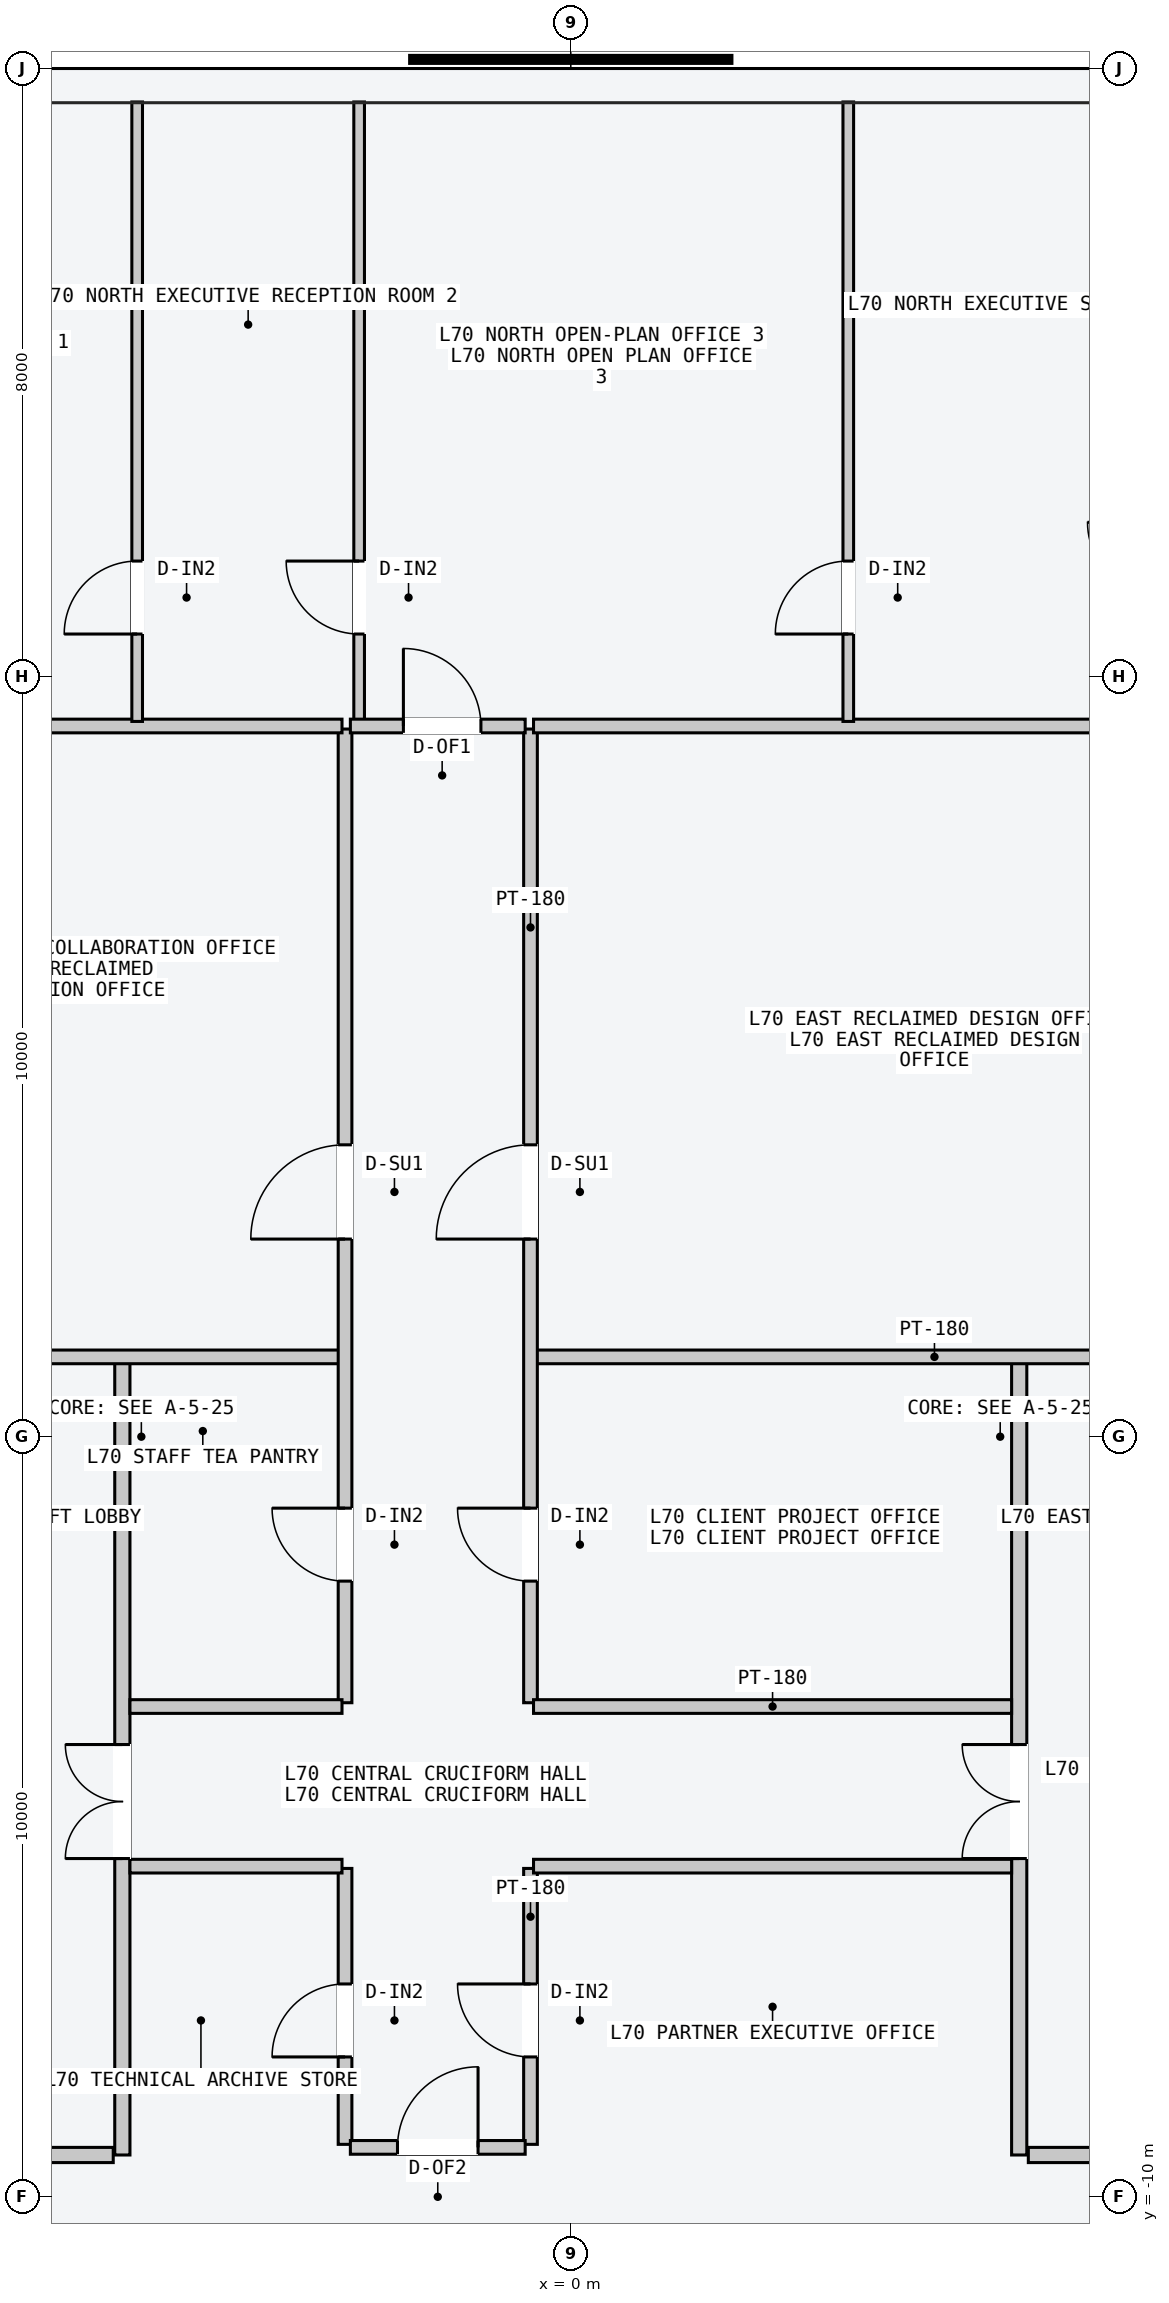
"""IFC4 building model, lengths in metres.
Left out: names, types, materials, properties, quantities, classifications, styles, units other than length and angle.
Written with IfcOpenShell. Run it as: python <this file> out.ifc"""

import sys

from ifc_helpers import new_model, si_unit, direction, frame, frame_2d, origin, place, context, subcontext, project, spatial, rectangle, extrude, element, fill, save


model = new_model("IFC4")
c1 = context("Model", 3, precision=1e-05, world=origin(), true_north=direction((0.0, 1.0)))
c2 = subcontext(c1, "Body", "Model", "MODEL_VIEW")
j1 = project(units=[si_unit("LENGTHUNIT", "METRE"), si_unit("PLANEANGLEUNIT", "RADIAN")], contexts=[c1])
p1 = place(None, origin())
s1 = spatial("IfcSite", under=j1, at=p1, CompositionType="ELEMENT")
p2 = place(p1, origin())
s2 = spatial("IfcBuilding", under=s1, at=p2, CompositionType="ELEMENT")
p3 = place(p2, frame((0.0, 0.0, 265.2)))
s3 = spatial("IfcBuildingStorey", under=s2, at=p3, CompositionType="ELEMENT", Elevation=265.2)
p4 = place(p3, frame((-5.9, -9.45, 0.0), z_axis=(0.0, 0.0, 1.0), x_axis=(0.0, 1.0, 0.0)))
e1 = element("IfcWall", 1, at=p4, inside=s3, PredefinedType="PARTITIONING", context=c2, shape_type="SweptSolid", body=[
    extrude(rectangle(XDim=10.5, YDim=0.2, at=frame_2d((5.25, 0.0))), origin(), (0.0, 0.0, 1.0), 3.4),
])
p5 = place(p4, frame((3.9, 0.0, 0.0)))
e2 = element("IfcOpeningElement", 2, at=p5, cuts=e1, PredefinedType="OPENING", context=c2, shape_type="SweptSolid", body=[
    extrude(rectangle(XDim=1.5, YDim=2.2, at=frame_2d((0.75, 1.1))), frame((0.0, 0.11, 0.0), z_axis=(0.0, -1.0, 0.0), x_axis=(1.0, 0.0, 0.0)), (0.0, 0.0, 1.0), 0.22),
])
p6 = place(p3, frame((-6.02, -9.45, 0.0), z_axis=(0.0, 0.0, 1.0), x_axis=(-1.0, 0.0, 0.0)))
e3 = element("IfcWall", 3, at=p6, inside=s3, PredefinedType="PARTITIONING", context=c2, shape_type="SweptSolid", body=[
    extrude(rectangle(XDim=1.8, YDim=0.2, at=frame_2d((0.9, 0.0))), origin(), (0.0, 0.0, 1.0), 3.4),
])
p7 = place(p3, frame((5.9, -9.45, 0.0), z_axis=(0.0, 0.0, 1.0), x_axis=(0.0, 1.0, 0.0)))
e4 = element("IfcWall", 4, at=p7, inside=s3, PredefinedType="PARTITIONING", context=c2, shape_type="SweptSolid", body=[
    extrude(rectangle(XDim=10.5, YDim=0.2, at=frame_2d((5.25, 0.0))), origin(), (0.0, 0.0, 1.0), 3.4),
])
p8 = place(p7, frame((3.9, 0.0, 0.0)))
e5 = element("IfcOpeningElement", 5, at=p8, cuts=e4, PredefinedType="OPENING", context=c2, shape_type="SweptSolid", body=[
    extrude(rectangle(XDim=1.5, YDim=2.2, at=frame_2d((0.75, 1.1))), frame((0.0, 0.11, 0.0), z_axis=(0.0, -1.0, 0.0), x_axis=(1.0, 0.0, 0.0)), (0.0, 0.0, 1.0), 0.22),
])
p9 = place(p3, frame((6.02, -9.45, 0.0), z_axis=(0.0, 0.0, 1.0), x_axis=(1.0, 0.0, 0.0)))
e6 = element("IfcWall", 6, at=p9, inside=s3, PredefinedType="PARTITIONING", context=c2, shape_type="SweptSolid", body=[
    extrude(rectangle(XDim=1.8, YDim=0.2, at=frame_2d((0.9, 0.0))), origin(), (0.0, 0.0, 1.0), 3.4),
])
p10 = place(p3, frame((-10.05, 1.05, 0.0), z_axis=(0.0, 0.0, 1.0), x_axis=(1.0, 0.0, 0.0)))
e7 = element("IfcWall", 7, at=p10, inside=s3, PredefinedType="PARTITIONING", context=c2, shape_type="SweptSolid", body=[
    extrude(rectangle(XDim=7.04, YDim=0.18, at=frame_2d((3.52, 0.0))), origin(), (0.0, 0.0, 1.0), 3.4),
])
p11 = place(p3, frame((-2.97, -3.5, 0.0), z_axis=(0.0, 0.0, 1.0), x_axis=(0.0, 1.0, 0.0)))
e8 = element("IfcWall", 8, at=p11, inside=s3, PredefinedType="PARTITIONING", context=c2, shape_type="SweptSolid", body=[
    extrude(rectangle(XDim=12.81, YDim=0.18, at=frame_2d((6.405, 0.0))), origin(), (0.0, 0.0, 1.0), 3.4),
])
p12 = place(p11, frame((6.1, 0.0, 0.0)))
e9 = element("IfcOpeningElement", 9, at=p12, cuts=e8, PredefinedType="OPENING", context=c2, shape_type="SweptSolid", body=[
    extrude(rectangle(XDim=1.24, YDim=2.24, at=frame_2d((0.62, 1.12))), frame((0.0, 0.1, 0.0), z_axis=(0.0, -1.0, 0.0), x_axis=(1.0, 0.0, 0.0)), (0.0, 0.0, 1.0), 0.2),
])
p13 = place(p11, frame((1.6, 0.0, 0.0)))
e10 = element("IfcOpeningElement", 10, at=p13, cuts=e8, PredefinedType="OPENING", context=c2, shape_type="SweptSolid", body=[
    extrude(rectangle(XDim=0.96, YDim=2.18, at=frame_2d((0.48, 1.09))), frame((0.0, 0.1, 0.0), z_axis=(0.0, -1.0, 0.0), x_axis=(1.0, 0.0, 0.0)), (0.0, 0.0, 1.0), 0.2),
])
p14 = place(p3, frame((-7.5, 9.35, 0.0), z_axis=(0.0, 0.0, 1.0), x_axis=(1.0, 0.0, 0.0)))
e11 = element("IfcWall", 11, at=p14, inside=s3, PredefinedType="PARTITIONING", context=c2, shape_type="SweptSolid", body=[
    extrude(rectangle(XDim=4.49, YDim=0.18, at=frame_2d((2.245, 0.0))), origin(), (0.0, 0.0, 1.0), 3.4),
])
p15 = place(p3, frame((-5.8, -3.55, 0.0), z_axis=(0.0, 0.0, 1.0), x_axis=(1.0, 0.0, 0.0)))
e12 = element("IfcWall", 12, at=p15, inside=s3, PredefinedType="PARTITIONING", context=c2, shape_type="SweptSolid", body=[
    extrude(rectangle(XDim=2.79, YDim=0.18, at=frame_2d((1.395, 0.0))), origin(), (0.0, 0.0, 1.0), 3.4),
])
p16 = place(p3, frame((-0.49, 1.05, 0.0), z_axis=(0.0, 0.0, 1.0), x_axis=(1.0, 0.0, 0.0)))
e13 = element("IfcWall", 13, at=p16, inside=s3, PredefinedType="PARTITIONING", context=c2, shape_type="SweptSolid", body=[
    extrude(rectangle(XDim=10.55, YDim=0.18, at=frame_2d((5.275, 0.0))), origin(), (0.0, 0.0, 1.0), 3.4),
])
p17 = place(p3, frame((-0.53, -3.5, 0.0), z_axis=(0.0, 0.0, 1.0), x_axis=(0.0, 1.0, 0.0)))
e14 = element("IfcWall", 14, at=p17, inside=s3, PredefinedType="PARTITIONING", context=c2, shape_type="SweptSolid", body=[
    extrude(rectangle(XDim=12.81, YDim=0.18, at=frame_2d((6.405, 0.0))), origin(), (0.0, 0.0, 1.0), 3.4),
])
p18 = place(p17, frame((6.1, 0.0, 0.0)))
e15 = element("IfcOpeningElement", 15, at=p18, cuts=e14, PredefinedType="OPENING", context=c2, shape_type="SweptSolid", body=[
    extrude(rectangle(XDim=1.24, YDim=2.24, at=frame_2d((0.62, 1.12))), frame((0.0, 0.1, 0.0), z_axis=(0.0, -1.0, 0.0), x_axis=(1.0, 0.0, 0.0)), (0.0, 0.0, 1.0), 0.2),
])
p19 = place(p17, frame((1.6, 0.0, 0.0)))
e16 = element("IfcOpeningElement", 16, at=p19, cuts=e14, PredefinedType="OPENING", context=c2, shape_type="SweptSolid", body=[
    extrude(rectangle(XDim=0.96, YDim=2.18, at=frame_2d((0.48, 1.09))), frame((0.0, 0.1, 0.0), z_axis=(0.0, -1.0, 0.0), x_axis=(1.0, 0.0, 0.0)), (0.0, 0.0, 1.0), 0.2),
])
p20 = place(p3, frame((-0.49, 9.35, 0.0), z_axis=(0.0, 0.0, 1.0), x_axis=(1.0, 0.0, 0.0)))
e17 = element("IfcWall", 17, at=p20, inside=s3, PredefinedType="PARTITIONING", context=c2, shape_type="SweptSolid", body=[
    extrude(rectangle(XDim=7.99, YDim=0.18, at=frame_2d((3.995, 0.0))), origin(), (0.0, 0.0, 1.0), 3.4),
])
p21 = place(p3, frame((-0.49, -3.55, 0.0), z_axis=(0.0, 0.0, 1.0), x_axis=(1.0, 0.0, 0.0)))
e18 = element("IfcWall", 18, at=p21, inside=s3, PredefinedType="PARTITIONING", context=c2, shape_type="SweptSolid", body=[
    extrude(rectangle(XDim=6.29, YDim=0.18, at=frame_2d((3.145, 0.0))), origin(), (0.0, 0.0, 1.0), 3.4),
])
p22 = place(p3, frame((-2.97, -9.31, 0.0), z_axis=(0.0, 0.0, 1.0), x_axis=(0.0, 1.0, 0.0)))
e19 = element("IfcWall", 19, at=p22, inside=s3, PredefinedType="PARTITIONING", context=c2, shape_type="SweptSolid", body=[
    extrude(rectangle(XDim=3.63, YDim=0.18, at=frame_2d((1.815, 0.0))), origin(), (0.0, 0.0, 1.0), 3.4),
])
p23 = place(p22, frame((1.15, 0.0, 0.0)))
e20 = element("IfcOpeningElement", 20, at=p23, cuts=e19, PredefinedType="OPENING", context=c2, shape_type="SweptSolid", body=[
    extrude(rectangle(XDim=0.96, YDim=2.18, at=frame_2d((0.48, 1.09))), frame((0.0, 0.1, 0.0), z_axis=(0.0, -1.0, 0.0), x_axis=(1.0, 0.0, 0.0)), (0.0, 0.0, 1.0), 0.2),
])
p24 = place(p3, frame((-0.53, -9.31, 0.0), z_axis=(0.0, 0.0, 1.0), x_axis=(0.0, 1.0, 0.0)))
e21 = element("IfcWall", 21, at=p24, inside=s3, PredefinedType="PARTITIONING", context=c2, shape_type="SweptSolid", body=[
    extrude(rectangle(XDim=3.63, YDim=0.18, at=frame_2d((1.815, 0.0))), origin(), (0.0, 0.0, 1.0), 3.4),
])
p25 = place(p24, frame((1.15, 0.0, 0.0)))
e22 = element("IfcOpeningElement", 22, at=p25, cuts=e21, PredefinedType="OPENING", context=c2, shape_type="SweptSolid", body=[
    extrude(rectangle(XDim=0.96, YDim=2.18, at=frame_2d((0.48, 1.09))), frame((0.0, 0.1, 0.0), z_axis=(0.0, -1.0, 0.0), x_axis=(1.0, 0.0, 0.0)), (0.0, 0.0, 1.0), 0.2),
])
p26 = place(p3, frame((-5.8, -5.65, 0.0), z_axis=(0.0, 0.0, 1.0), x_axis=(1.0, 0.0, 0.0)))
e23 = element("IfcWall", 23, at=p26, inside=s3, PredefinedType="PARTITIONING", context=c2, shape_type="SweptSolid", body=[
    extrude(rectangle(XDim=2.79, YDim=0.18, at=frame_2d((1.395, 0.0))), origin(), (0.0, 0.0, 1.0), 3.4),
])
p27 = place(p3, frame((-0.49, -5.65, 0.0), z_axis=(0.0, 0.0, 1.0), x_axis=(1.0, 0.0, 0.0)))
e24 = element("IfcWall", 24, at=p27, inside=s3, PredefinedType="PARTITIONING", context=c2, shape_type="SweptSolid", body=[
    extrude(rectangle(XDim=6.29, YDim=0.18, at=frame_2d((3.145, 0.0))), origin(), (0.0, 0.0, 1.0), 3.4),
])
p28 = place(p3, frame((-5.705, 9.41, 0.0), z_axis=(0.0, 0.0, 1.0), x_axis=(0.0, 1.0, 0.0)))
e25 = element("IfcWall", 25, at=p28, inside=s3, PredefinedType="PARTITIONING", context=c2, shape_type="SweptSolid", body=[
    extrude(rectangle(XDim=8.15, YDim=0.14, at=frame_2d((4.075, 0.0))), origin(), (0.0, 0.0, 1.0), 3.4),
])
p29 = place(p28, frame((1.15, 0.0, 0.0)))
e26 = element("IfcOpeningElement", 26, at=p29, cuts=e25, PredefinedType="OPENING", context=c2, shape_type="SweptSolid", body=[
    extrude(rectangle(XDim=0.96, YDim=2.18, at=frame_2d((0.48, 1.09))), frame((0.0, 0.08, 0.0), z_axis=(0.0, -1.0, 0.0), x_axis=(1.0, 0.0, 0.0)), (0.0, 0.0, 1.0), 0.16),
])
p30 = place(p3, frame((-2.785, 9.41, 0.0), z_axis=(0.0, 0.0, 1.0), x_axis=(0.0, 1.0, 0.0)))
e27 = element("IfcWall", 27, at=p30, inside=s3, PredefinedType="PARTITIONING", context=c2, shape_type="SweptSolid", body=[
    extrude(rectangle(XDim=8.15, YDim=0.14, at=frame_2d((4.075, 0.0))), origin(), (0.0, 0.0, 1.0), 3.4),
])
p31 = place(p30, frame((1.15, 0.0, 0.0)))
e28 = element("IfcOpeningElement", 28, at=p31, cuts=e27, PredefinedType="OPENING", context=c2, shape_type="SweptSolid", body=[
    extrude(rectangle(XDim=0.96, YDim=2.18, at=frame_2d((0.48, 1.09))), frame((0.0, 0.08, 0.0), z_axis=(0.0, -1.0, 0.0), x_axis=(1.0, 0.0, 0.0)), (0.0, 0.0, 1.0), 0.16),
])
p32 = place(p3, frame((3.651, 9.41, 0.0), z_axis=(0.0, 0.0, 1.0), x_axis=(0.0, 1.0, 0.0)))
e29 = element("IfcWall", 29, at=p32, inside=s3, PredefinedType="PARTITIONING", context=c2, shape_type="SweptSolid", body=[
    extrude(rectangle(XDim=8.15, YDim=0.14, at=frame_2d((4.075, 0.0))), origin(), (0.0, 0.0, 1.0), 3.4),
])
p33 = place(p32, frame((1.15, 0.0, 0.0)))
e30 = element("IfcOpeningElement", 30, at=p33, cuts=e29, PredefinedType="OPENING", context=c2, shape_type="SweptSolid", body=[
    extrude(rectangle(XDim=0.96, YDim=2.18, at=frame_2d((0.48, 1.09))), frame((0.0, 0.08, 0.0), z_axis=(0.0, -1.0, 0.0), x_axis=(1.0, 0.0, 0.0)), (0.0, 0.0, 1.0), 0.16),
])
p34 = place(p3, frame((-2.9, 9.35, 0.0), z_axis=(0.0, 0.0, 1.0), x_axis=(1.0, 0.0, 0.0)))
e31 = element("IfcWall", 31, at=p34, inside=s3, PredefinedType="PARTITIONING", context=c2, shape_type="SweptSolid", body=[
    extrude(rectangle(XDim=2.3, YDim=0.18, at=frame_2d((1.15, 0.0))), origin(), (0.0, 0.0, 1.0), 3.4),
])
p35 = place(p34, frame((0.698, 0.0, 0.0)))
e32 = element("IfcOpeningElement", 32, at=p35, cuts=e31, PredefinedType="OPENING", context=c2, shape_type="SweptSolid", body=[
    extrude(rectangle(XDim=1.02, YDim=2.2, at=frame_2d((0.51, 1.1))), frame((0.0, 0.1, 0.0), z_axis=(0.0, -1.0, 0.0), x_axis=(1.0, 0.0, 0.0)), (0.0, 0.0, 1.0), 0.2),
])
p36 = place(p3, frame((-2.9, -9.35, 0.0), z_axis=(0.0, 0.0, 1.0), x_axis=(1.0, 0.0, 0.0)))
e33 = element("IfcWall", 33, at=p36, inside=s3, PredefinedType="PARTITIONING", context=c2, shape_type="SweptSolid", body=[
    extrude(rectangle(XDim=2.3, YDim=0.18, at=frame_2d((1.15, 0.0))), origin(), (0.0, 0.0, 1.0), 3.4),
])
p37 = place(p36, frame((0.62, 0.0, 0.0)))
e34 = element("IfcOpeningElement", 34, at=p37, cuts=e33, PredefinedType="OPENING", context=c2, shape_type="SweptSolid", body=[
    extrude(rectangle(XDim=1.06, YDim=2.2, at=frame_2d((0.53, 1.1))), frame((0.0, 0.1, 0.0), z_axis=(0.0, -1.0, 0.0), x_axis=(1.0, 0.0, 0.0)), (0.0, 0.0, 1.0), 0.2),
])
p38 = place(p5, origin())
e35 = element("IfcDoor", 35, at=p38, inside=s3, OperationType="DOUBLE_DOOR_SINGLE_SWING", PredefinedType="DOOR", context=c2, shape_type="SweptSolid", body=[
    extrude(rectangle(XDim=1.5, YDim=2.2, at=frame_2d((0.75, 1.1))), frame((0.0, 0.025, 0.0), z_axis=(0.0, -1.0, 0.0), x_axis=(1.0, 0.0, 0.0)), (0.0, 0.0, 1.0), 0.05),
])
fill(e2, e35)
p39 = place(p8, origin())
e36 = element("IfcDoor", 36, at=p39, inside=s3, OperationType="DOUBLE_DOOR_SINGLE_SWING", PredefinedType="DOOR", context=c2, shape_type="SweptSolid", body=[
    extrude(rectangle(XDim=1.5, YDim=2.2, at=frame_2d((0.75, 1.1))), frame((0.0, 0.025, 0.0), z_axis=(0.0, -1.0, 0.0), x_axis=(1.0, 0.0, 0.0)), (0.0, 0.0, 1.0), 0.05),
])
fill(e5, e36)
p40 = place(p12, origin())
e37 = element("IfcDoor", 37, at=p40, inside=s3, OperationType="SINGLE_SWING_LEFT", PredefinedType="DOOR", context=c2, shape_type="SweptSolid", body=[
    extrude(rectangle(XDim=1.24, YDim=2.24, at=frame_2d((0.62, 1.12))), frame((0.0, 0.025, 0.0), z_axis=(0.0, -1.0, 0.0), x_axis=(1.0, 0.0, 0.0)), (0.0, 0.0, 1.0), 0.05),
])
fill(e9, e37)
p41 = place(p13, origin())
e38 = element("IfcDoor", 38, at=p41, inside=s3, OperationType="SINGLE_SWING_RIGHT", PredefinedType="DOOR", context=c2, shape_type="SweptSolid", body=[
    extrude(rectangle(XDim=0.96, YDim=2.18, at=frame_2d((0.48, 1.09))), frame((0.0, 0.025, 0.0), z_axis=(0.0, -1.0, 0.0), x_axis=(1.0, 0.0, 0.0)), (0.0, 0.0, 1.0), 0.05),
])
fill(e10, e38)
p42 = place(p18, origin())
e39 = element("IfcDoor", 39, at=p42, inside=s3, OperationType="SINGLE_SWING_LEFT", PredefinedType="DOOR", context=c2, shape_type="SweptSolid", body=[
    extrude(rectangle(XDim=1.24, YDim=2.24, at=frame_2d((0.62, 1.12))), frame((0.0, 0.025, 0.0), z_axis=(0.0, -1.0, 0.0), x_axis=(1.0, 0.0, 0.0)), (0.0, 0.0, 1.0), 0.05),
])
fill(e15, e39)
p43 = place(p19, origin())
e40 = element("IfcDoor", 40, at=p43, inside=s3, OperationType="SINGLE_SWING_RIGHT", PredefinedType="DOOR", context=c2, shape_type="SweptSolid", body=[
    extrude(rectangle(XDim=0.96, YDim=2.18, at=frame_2d((0.48, 1.09))), frame((0.0, 0.025, 0.0), z_axis=(0.0, -1.0, 0.0), x_axis=(1.0, 0.0, 0.0)), (0.0, 0.0, 1.0), 0.05),
])
fill(e16, e40)
p44 = place(p23, origin())
e41 = element("IfcDoor", 41, at=p44, inside=s3, OperationType="SINGLE_SWING_LEFT", PredefinedType="DOOR", context=c2, shape_type="SweptSolid", body=[
    extrude(rectangle(XDim=0.96, YDim=2.18, at=frame_2d((0.48, 1.09))), frame((0.0, 0.025, 0.0), z_axis=(0.0, -1.0, 0.0), x_axis=(1.0, 0.0, 0.0)), (0.0, 0.0, 1.0), 0.05),
])
fill(e20, e41)
p45 = place(p25, origin())
e42 = element("IfcDoor", 42, at=p45, inside=s3, OperationType="SINGLE_SWING_RIGHT", PredefinedType="DOOR", context=c2, shape_type="SweptSolid", body=[
    extrude(rectangle(XDim=0.96, YDim=2.18, at=frame_2d((0.48, 1.09))), frame((0.0, 0.025, 0.0), z_axis=(0.0, -1.0, 0.0), x_axis=(1.0, 0.0, 0.0)), (0.0, 0.0, 1.0), 0.05),
])
fill(e22, e42)
p46 = place(p29, origin())
e43 = element("IfcDoor", 43, at=p46, inside=s3, OperationType="SINGLE_SWING_LEFT", PredefinedType="DOOR", context=c2, shape_type="SweptSolid", body=[
    extrude(rectangle(XDim=0.96, YDim=2.18, at=frame_2d((0.48, 1.09))), frame((0.0, 0.025, 0.0), z_axis=(0.0, -1.0, 0.0), x_axis=(1.0, 0.0, 0.0)), (0.0, 0.0, 1.0), 0.05),
])
fill(e26, e43)
p47 = place(p31, origin())
e44 = element("IfcDoor", 44, at=p47, inside=s3, OperationType="SINGLE_SWING_RIGHT", PredefinedType="DOOR", context=c2, shape_type="SweptSolid", body=[
    extrude(rectangle(XDim=0.96, YDim=2.18, at=frame_2d((0.48, 1.09))), frame((0.0, 0.025, 0.0), z_axis=(0.0, -1.0, 0.0), x_axis=(1.0, 0.0, 0.0)), (0.0, 0.0, 1.0), 0.05),
])
fill(e28, e44)
p48 = place(p33, origin())
e45 = element("IfcDoor", 45, at=p48, inside=s3, OperationType="SINGLE_SWING_LEFT", PredefinedType="DOOR", context=c2, shape_type="SweptSolid", body=[
    extrude(rectangle(XDim=0.96, YDim=2.18, at=frame_2d((0.48, 1.09))), frame((0.0, 0.025, 0.0), z_axis=(0.0, -1.0, 0.0), x_axis=(1.0, 0.0, 0.0)), (0.0, 0.0, 1.0), 0.05),
])
fill(e30, e45)
p49 = place(p35, origin())
e46 = element("IfcDoor", 46, at=p49, inside=s3, OperationType="SINGLE_SWING_LEFT", PredefinedType="DOOR", context=c2, shape_type="SweptSolid", body=[
    extrude(rectangle(XDim=1.02, YDim=2.2, at=frame_2d((0.51, 1.1))), frame((0.0, 0.025, 0.0), z_axis=(0.0, -1.0, 0.0), x_axis=(1.0, 0.0, 0.0)), (0.0, 0.0, 1.0), 0.05),
])
fill(e32, e46)
p50 = place(p37, origin())
e47 = element("IfcDoor", 47, at=p50, inside=s3, OperationType="SINGLE_SWING_RIGHT", PredefinedType="DOOR", context=c2, shape_type="SweptSolid", body=[
    extrude(rectangle(XDim=1.06, YDim=2.2, at=frame_2d((0.53, 1.1))), frame((0.0, 0.025, 0.0), z_axis=(0.0, -1.0, 0.0), x_axis=(1.0, 0.0, 0.0)), (0.0, 0.0, 1.0), 0.05),
])
fill(e34, e47)
save(model, sys.argv[1])
